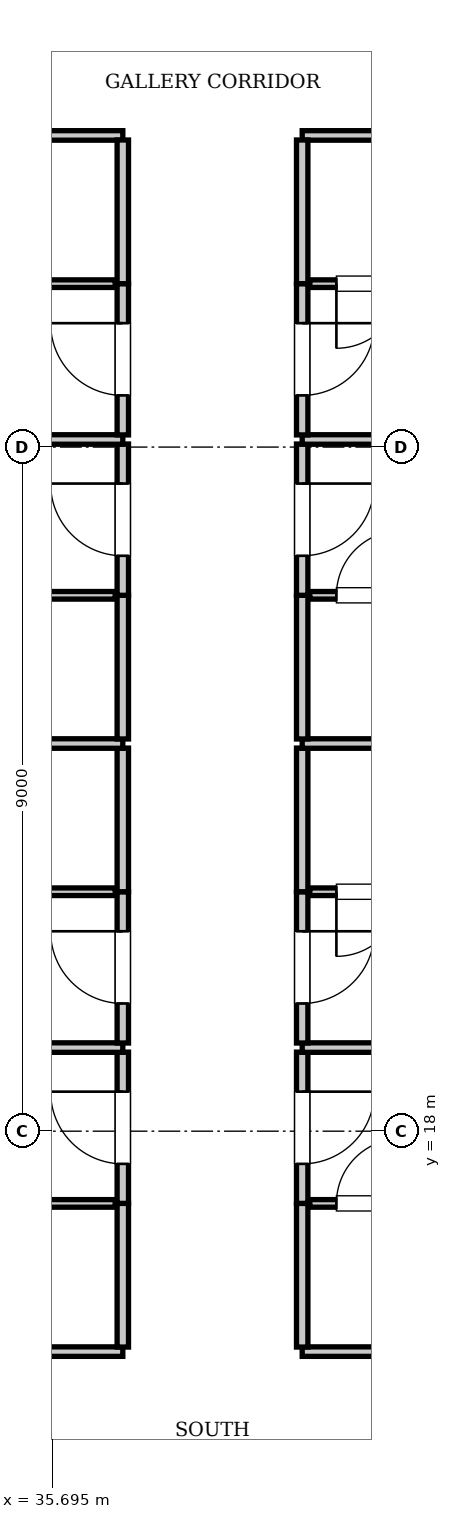
"""IFC4 building model, lengths in metres.
Left out: names, types, materials, properties, quantities, classifications, styles, units other than length and angle.
Written with IfcOpenShell. Run it as: python <this file> out.ifc"""

import sys

from ifc_helpers import new_model, si_unit, direction, frame, frame_2d, origin, place, context, subcontext, project, spatial, rectangle, extrude, element, fill, save


model = new_model("IFC4")
c1 = context("Model", 3, precision=1e-05, world=origin(), true_north=direction((0.0, 1.0)))
c2 = subcontext(c1, "Body", "Model", "MODEL_VIEW")
j1 = project(units=[si_unit("LENGTHUNIT", "METRE"), si_unit("PLANEANGLEUNIT", "RADIAN")], contexts=[c1])
p1 = place(None, origin())
s1 = spatial("IfcSite", under=j1, at=p1, CompositionType="ELEMENT")
p2 = place(p1, origin())
s2 = spatial("IfcBuilding", under=s1, at=p2, CompositionType="ELEMENT")
p3 = place(p2, frame((0.0, 0.0, 135.1)))
s3 = spatial("IfcBuildingStorey", under=s2, at=p3, CompositionType="ELEMENT", Elevation=135.1)
p4 = place(p3, frame((13.2, 15.1, 0.0), z_axis=(0.0, 0.0, 1.0), x_axis=(1.0, 0.0, 0.0)))
e1 = element("IfcWall", 1, at=p4, inside=s3, PredefinedType="PARTITIONING", context=c2, shape_type="SweptSolid", body=[
    extrude(rectangle(XDim=23.42, YDim=0.125, at=frame_2d((11.71, 0.0))), origin(), (0.0, 0.0, 1.0), 3.61),
])
p5 = place(p3, frame((38.98, 15.1, 0.0), z_axis=(0.0, 0.0, 1.0), x_axis=(1.0, 0.0, 0.0)))
e2 = element("IfcWall", 2, at=p5, inside=s3, PredefinedType="PARTITIONING", context=c2, shape_type="SweptSolid", body=[
    extrude(rectangle(XDim=23.42, YDim=0.125, at=frame_2d((11.71, 0.0))), origin(), (0.0, 0.0, 1.0), 3.61),
])
p6 = place(p3, frame((13.2, 31.1, 0.0), z_axis=(0.0, 0.0, 1.0), x_axis=(1.0, 0.0, 0.0)))
e3 = element("IfcWall", 3, at=p6, inside=s3, PredefinedType="PARTITIONING", context=c2, shape_type="SweptSolid", body=[
    extrude(rectangle(XDim=23.42, YDim=0.125, at=frame_2d((11.71, 0.0))), origin(), (0.0, 0.0, 1.0), 3.61),
])
p7 = place(p3, frame((38.98, 31.1, 0.0), z_axis=(0.0, 0.0, 1.0), x_axis=(1.0, 0.0, 0.0)))
e4 = element("IfcWall", 4, at=p7, inside=s3, PredefinedType="PARTITIONING", context=c2, shape_type="SweptSolid", body=[
    extrude(rectangle(XDim=23.42, YDim=0.125, at=frame_2d((11.71, 0.0))), origin(), (0.0, 0.0, 1.0), 3.61),
])
p8 = place(p3, frame((36.62, 15.16, 0.0), z_axis=(0.0, 0.0, 1.0), x_axis=(0.0, 1.0, 0.0)))
e5 = element("IfcWall", 5, at=p8, inside=s3, PredefinedType="PARTITIONING", context=c2, shape_type="SweptSolid", body=[
    extrude(rectangle(XDim=1.89, YDim=0.15, at=frame_2d((0.945, 0.0))), origin(), (0.0, 0.0, 1.0), 3.61),
])
p9 = place(p3, frame((36.62, 17.05, 0.0), z_axis=(0.0, 0.0, 1.0), x_axis=(0.0, 1.0, 0.0)))
e6 = element("IfcWall", 6, at=p9, inside=s3, PredefinedType="PARTITIONING", context=c2, shape_type="SweptSolid", body=[
    extrude(rectangle(XDim=1.99, YDim=0.15, at=frame_2d((0.995, 0.0))), origin(), (0.0, 0.0, 1.0), 3.61),
])
p10 = place(p9, frame((0.52, 0.0, 0.0)))
e7 = element("IfcOpeningElement", 7, at=p10, cuts=e6, PredefinedType="OPENING", context=c2, shape_type="SweptSolid", body=[
    extrude(rectangle(XDim=0.95, YDim=2.15, at=frame_2d((0.475, 1.075))), frame((0.0, 0.085, 0.0), z_axis=(0.0, -1.0, 0.0), x_axis=(1.0, 0.0, 0.0)), (0.0, 0.0, 1.0), 0.17),
])
p11 = place(p3, frame((34.22, 17.05, 0.0), z_axis=(0.0, 0.0, 1.0), x_axis=(1.0, 0.0, 0.0)))
e8 = element("IfcWall", 8, at=p11, inside=s3, PredefinedType="PARTITIONING", context=c2, shape_type="SweptSolid", body=[
    extrude(rectangle(XDim=2.3, YDim=0.1, at=frame_2d((1.15, 0.0))), origin(), (0.0, 0.0, 1.0), 3.61),
])
p12 = place(p11, frame((0.35, 0.0, 0.0)))
e9 = element("IfcOpeningElement", 9, at=p12, cuts=e8, PredefinedType="OPENING", context=c2, shape_type="SweptSolid", body=[
    extrude(rectangle(XDim=0.85, YDim=2.1, at=frame_2d((0.425, 1.05))), frame((0.0, 0.06, 0.0), z_axis=(0.0, -1.0, 0.0), x_axis=(1.0, 0.0, 0.0)), (0.0, 0.0, 1.0), 0.12),
])
p13 = place(p3, frame((38.98, 15.16, 0.0), z_axis=(0.0, 0.0, 1.0), x_axis=(0.0, 1.0, 0.0)))
e10 = element("IfcWall", 10, at=p13, inside=s3, PredefinedType="PARTITIONING", context=c2, shape_type="SweptSolid", body=[
    extrude(rectangle(XDim=1.89, YDim=0.15, at=frame_2d((0.945, 0.0))), origin(), (0.0, 0.0, 1.0), 3.61),
])
p14 = place(p3, frame((38.98, 17.05, 0.0), z_axis=(0.0, 0.0, 1.0), x_axis=(0.0, 1.0, 0.0)))
e11 = element("IfcWall", 11, at=p14, inside=s3, PredefinedType="PARTITIONING", context=c2, shape_type="SweptSolid", body=[
    extrude(rectangle(XDim=1.99, YDim=0.15, at=frame_2d((0.995, 0.0))), origin(), (0.0, 0.0, 1.0), 3.61),
])
p15 = place(p14, frame((0.52, 0.0, 0.0)))
e12 = element("IfcOpeningElement", 12, at=p15, cuts=e11, PredefinedType="OPENING", context=c2, shape_type="SweptSolid", body=[
    extrude(rectangle(XDim=0.95, YDim=2.15, at=frame_2d((0.475, 1.075))), frame((0.0, 0.085, 0.0), z_axis=(0.0, -1.0, 0.0), x_axis=(1.0, 0.0, 0.0)), (0.0, 0.0, 1.0), 0.17),
])
p16 = place(p3, frame((39.08, 17.05, 0.0), z_axis=(0.0, 0.0, 1.0), x_axis=(1.0, 0.0, 0.0)))
e13 = element("IfcWall", 13, at=p16, inside=s3, PredefinedType="PARTITIONING", context=c2, shape_type="SweptSolid", body=[
    extrude(rectangle(XDim=2.3, YDim=0.1, at=frame_2d((1.15, 0.0))), origin(), (0.0, 0.0, 1.0), 3.61),
])
p17 = place(p16, frame((0.35, 0.0, 0.0)))
e14 = element("IfcOpeningElement", 14, at=p17, cuts=e13, PredefinedType="OPENING", context=c2, shape_type="SweptSolid", body=[
    extrude(rectangle(XDim=0.85, YDim=2.1, at=frame_2d((0.425, 1.05))), frame((0.0, 0.06, 0.0), z_axis=(0.0, -1.0, 0.0), x_axis=(1.0, 0.0, 0.0)), (0.0, 0.0, 1.0), 0.12),
])
p18 = place(p3, frame((13.2, 19.1, 0.0), z_axis=(0.0, 0.0, 1.0), x_axis=(1.0, 0.0, 0.0)))
e15 = element("IfcWall", 15, at=p18, inside=s3, PredefinedType="PARTITIONING", context=c2, shape_type="SweptSolid", body=[
    extrude(rectangle(XDim=23.42, YDim=0.125, at=frame_2d((11.71, 0.0))), origin(), (0.0, 0.0, 1.0), 3.61),
])
p19 = place(p3, frame((38.98, 19.1, 0.0), z_axis=(0.0, 0.0, 1.0), x_axis=(1.0, 0.0, 0.0)))
e16 = element("IfcWall", 16, at=p19, inside=s3, PredefinedType="PARTITIONING", context=c2, shape_type="SweptSolid", body=[
    extrude(rectangle(XDim=23.42, YDim=0.125, at=frame_2d((11.71, 0.0))), origin(), (0.0, 0.0, 1.0), 3.61),
])
p20 = place(p3, frame((36.62, 19.16, 0.0), z_axis=(0.0, 0.0, 1.0), x_axis=(0.0, 1.0, 0.0)))
e17 = element("IfcWall", 17, at=p20, inside=s3, PredefinedType="PARTITIONING", context=c2, shape_type="SweptSolid", body=[
    extrude(rectangle(XDim=1.99, YDim=0.15, at=frame_2d((0.995, 0.0))), origin(), (0.0, 0.0, 1.0), 3.61),
])
p21 = place(p20, frame((0.52, 0.0, 0.0)))
e18 = element("IfcOpeningElement", 18, at=p21, cuts=e17, PredefinedType="OPENING", context=c2, shape_type="SweptSolid", body=[
    extrude(rectangle(XDim=0.95, YDim=2.15, at=frame_2d((0.475, 1.075))), frame((0.0, 0.085, 0.0), z_axis=(0.0, -1.0, 0.0), x_axis=(1.0, 0.0, 0.0)), (0.0, 0.0, 1.0), 0.17),
])
p22 = place(p3, frame((36.62, 21.15, 0.0), z_axis=(0.0, 0.0, 1.0), x_axis=(0.0, 1.0, 0.0)))
e19 = element("IfcWall", 19, at=p22, inside=s3, PredefinedType="PARTITIONING", context=c2, shape_type="SweptSolid", body=[
    extrude(rectangle(XDim=1.89, YDim=0.15, at=frame_2d((0.945, 0.0))), origin(), (0.0, 0.0, 1.0), 3.61),
])
p23 = place(p3, frame((34.22, 21.15, 0.0), z_axis=(0.0, 0.0, 1.0), x_axis=(1.0, 0.0, 0.0)))
e20 = element("IfcWall", 20, at=p23, inside=s3, PredefinedType="PARTITIONING", context=c2, shape_type="SweptSolid", body=[
    extrude(rectangle(XDim=2.3, YDim=0.1, at=frame_2d((1.15, 0.0))), origin(), (0.0, 0.0, 1.0), 3.61),
])
p24 = place(p23, frame((0.35, 0.0, 0.0)))
e21 = element("IfcOpeningElement", 21, at=p24, cuts=e20, PredefinedType="OPENING", context=c2, shape_type="SweptSolid", body=[
    extrude(rectangle(XDim=0.85, YDim=2.1, at=frame_2d((0.425, 1.05))), frame((0.0, 0.06, 0.0), z_axis=(0.0, -1.0, 0.0), x_axis=(1.0, 0.0, 0.0)), (0.0, 0.0, 1.0), 0.12),
])
p25 = place(p3, frame((38.98, 19.16, 0.0), z_axis=(0.0, 0.0, 1.0), x_axis=(0.0, 1.0, 0.0)))
e22 = element("IfcWall", 22, at=p25, inside=s3, PredefinedType="PARTITIONING", context=c2, shape_type="SweptSolid", body=[
    extrude(rectangle(XDim=1.99, YDim=0.15, at=frame_2d((0.995, 0.0))), origin(), (0.0, 0.0, 1.0), 3.61),
])
p26 = place(p25, frame((0.52, 0.0, 0.0)))
e23 = element("IfcOpeningElement", 23, at=p26, cuts=e22, PredefinedType="OPENING", context=c2, shape_type="SweptSolid", body=[
    extrude(rectangle(XDim=0.95, YDim=2.15, at=frame_2d((0.475, 1.075))), frame((0.0, 0.085, 0.0), z_axis=(0.0, -1.0, 0.0), x_axis=(1.0, 0.0, 0.0)), (0.0, 0.0, 1.0), 0.17),
])
p27 = place(p3, frame((38.98, 21.15, 0.0), z_axis=(0.0, 0.0, 1.0), x_axis=(0.0, 1.0, 0.0)))
e24 = element("IfcWall", 24, at=p27, inside=s3, PredefinedType="PARTITIONING", context=c2, shape_type="SweptSolid", body=[
    extrude(rectangle(XDim=1.89, YDim=0.15, at=frame_2d((0.945, 0.0))), origin(), (0.0, 0.0, 1.0), 3.61),
])
p28 = place(p3, frame((39.08, 21.15, 0.0), z_axis=(0.0, 0.0, 1.0), x_axis=(1.0, 0.0, 0.0)))
e25 = element("IfcWall", 25, at=p28, inside=s3, PredefinedType="PARTITIONING", context=c2, shape_type="SweptSolid", body=[
    extrude(rectangle(XDim=2.3, YDim=0.1, at=frame_2d((1.15, 0.0))), origin(), (0.0, 0.0, 1.0), 3.61),
])
p29 = place(p28, frame((0.35, 0.0, 0.0)))
e26 = element("IfcOpeningElement", 26, at=p29, cuts=e25, PredefinedType="OPENING", context=c2, shape_type="SweptSolid", body=[
    extrude(rectangle(XDim=0.85, YDim=2.1, at=frame_2d((0.425, 1.05))), frame((0.0, 0.06, 0.0), z_axis=(0.0, -1.0, 0.0), x_axis=(1.0, 0.0, 0.0)), (0.0, 0.0, 1.0), 0.12),
])
p30 = place(p3, frame((13.2, 23.1, 0.0), z_axis=(0.0, 0.0, 1.0), x_axis=(1.0, 0.0, 0.0)))
e27 = element("IfcWall", 27, at=p30, inside=s3, PredefinedType="PARTITIONING", context=c2, shape_type="SweptSolid", body=[
    extrude(rectangle(XDim=23.42, YDim=0.125, at=frame_2d((11.71, 0.0))), origin(), (0.0, 0.0, 1.0), 3.61),
])
p31 = place(p3, frame((38.98, 23.1, 0.0), z_axis=(0.0, 0.0, 1.0), x_axis=(1.0, 0.0, 0.0)))
e28 = element("IfcWall", 28, at=p31, inside=s3, PredefinedType="PARTITIONING", context=c2, shape_type="SweptSolid", body=[
    extrude(rectangle(XDim=23.42, YDim=0.125, at=frame_2d((11.71, 0.0))), origin(), (0.0, 0.0, 1.0), 3.61),
])
p32 = place(p3, frame((36.62, 23.16, 0.0), z_axis=(0.0, 0.0, 1.0), x_axis=(0.0, 1.0, 0.0)))
e29 = element("IfcWall", 29, at=p32, inside=s3, PredefinedType="PARTITIONING", context=c2, shape_type="SweptSolid", body=[
    extrude(rectangle(XDim=1.89, YDim=0.15, at=frame_2d((0.945, 0.0))), origin(), (0.0, 0.0, 1.0), 3.61),
])
p33 = place(p3, frame((36.62, 25.05, 0.0), z_axis=(0.0, 0.0, 1.0), x_axis=(0.0, 1.0, 0.0)))
e30 = element("IfcWall", 30, at=p33, inside=s3, PredefinedType="PARTITIONING", context=c2, shape_type="SweptSolid", body=[
    extrude(rectangle(XDim=1.99, YDim=0.15, at=frame_2d((0.995, 0.0))), origin(), (0.0, 0.0, 1.0), 3.61),
])
p34 = place(p33, frame((0.52, 0.0, 0.0)))
e31 = element("IfcOpeningElement", 31, at=p34, cuts=e30, PredefinedType="OPENING", context=c2, shape_type="SweptSolid", body=[
    extrude(rectangle(XDim=0.95, YDim=2.15, at=frame_2d((0.475, 1.075))), frame((0.0, 0.085, 0.0), z_axis=(0.0, -1.0, 0.0), x_axis=(1.0, 0.0, 0.0)), (0.0, 0.0, 1.0), 0.17),
])
p35 = place(p3, frame((34.22, 25.05, 0.0), z_axis=(0.0, 0.0, 1.0), x_axis=(1.0, 0.0, 0.0)))
e32 = element("IfcWall", 32, at=p35, inside=s3, PredefinedType="PARTITIONING", context=c2, shape_type="SweptSolid", body=[
    extrude(rectangle(XDim=2.3, YDim=0.1, at=frame_2d((1.15, 0.0))), origin(), (0.0, 0.0, 1.0), 3.61),
])
p36 = place(p35, frame((0.35, 0.0, 0.0)))
e33 = element("IfcOpeningElement", 33, at=p36, cuts=e32, PredefinedType="OPENING", context=c2, shape_type="SweptSolid", body=[
    extrude(rectangle(XDim=0.85, YDim=2.1, at=frame_2d((0.425, 1.05))), frame((0.0, 0.06, 0.0), z_axis=(0.0, -1.0, 0.0), x_axis=(1.0, 0.0, 0.0)), (0.0, 0.0, 1.0), 0.12),
])
p37 = place(p3, frame((38.98, 23.16, 0.0), z_axis=(0.0, 0.0, 1.0), x_axis=(0.0, 1.0, 0.0)))
e34 = element("IfcWall", 34, at=p37, inside=s3, PredefinedType="PARTITIONING", context=c2, shape_type="SweptSolid", body=[
    extrude(rectangle(XDim=1.89, YDim=0.15, at=frame_2d((0.945, 0.0))), origin(), (0.0, 0.0, 1.0), 3.61),
])
p38 = place(p3, frame((38.98, 25.05, 0.0), z_axis=(0.0, 0.0, 1.0), x_axis=(0.0, 1.0, 0.0)))
e35 = element("IfcWall", 35, at=p38, inside=s3, PredefinedType="PARTITIONING", context=c2, shape_type="SweptSolid", body=[
    extrude(rectangle(XDim=1.99, YDim=0.15, at=frame_2d((0.995, 0.0))), origin(), (0.0, 0.0, 1.0), 3.61),
])
p39 = place(p38, frame((0.52, 0.0, 0.0)))
e36 = element("IfcOpeningElement", 36, at=p39, cuts=e35, PredefinedType="OPENING", context=c2, shape_type="SweptSolid", body=[
    extrude(rectangle(XDim=0.95, YDim=2.15, at=frame_2d((0.475, 1.075))), frame((0.0, 0.085, 0.0), z_axis=(0.0, -1.0, 0.0), x_axis=(1.0, 0.0, 0.0)), (0.0, 0.0, 1.0), 0.17),
])
p40 = place(p3, frame((39.08, 25.05, 0.0), z_axis=(0.0, 0.0, 1.0), x_axis=(1.0, 0.0, 0.0)))
e37 = element("IfcWall", 37, at=p40, inside=s3, PredefinedType="PARTITIONING", context=c2, shape_type="SweptSolid", body=[
    extrude(rectangle(XDim=2.3, YDim=0.1, at=frame_2d((1.15, 0.0))), origin(), (0.0, 0.0, 1.0), 3.61),
])
p41 = place(p40, frame((0.35, 0.0, 0.0)))
e38 = element("IfcOpeningElement", 38, at=p41, cuts=e37, PredefinedType="OPENING", context=c2, shape_type="SweptSolid", body=[
    extrude(rectangle(XDim=0.85, YDim=2.1, at=frame_2d((0.425, 1.05))), frame((0.0, 0.06, 0.0), z_axis=(0.0, -1.0, 0.0), x_axis=(1.0, 0.0, 0.0)), (0.0, 0.0, 1.0), 0.12),
])
p42 = place(p3, frame((13.2, 27.1, 0.0), z_axis=(0.0, 0.0, 1.0), x_axis=(1.0, 0.0, 0.0)))
e39 = element("IfcWall", 39, at=p42, inside=s3, PredefinedType="PARTITIONING", context=c2, shape_type="SweptSolid", body=[
    extrude(rectangle(XDim=23.42, YDim=0.125, at=frame_2d((11.71, 0.0))), origin(), (0.0, 0.0, 1.0), 2.41),
])
p43 = place(p3, frame((38.98, 27.1, 0.0), z_axis=(0.0, 0.0, 1.0), x_axis=(1.0, 0.0, 0.0)))
e40 = element("IfcWall", 40, at=p43, inside=s3, PredefinedType="PARTITIONING", context=c2, shape_type="SweptSolid", body=[
    extrude(rectangle(XDim=23.42, YDim=0.125, at=frame_2d((11.71, 0.0))), origin(), (0.0, 0.0, 1.0), 2.41),
])
p44 = place(p3, frame((36.62, 27.16, 0.0), z_axis=(0.0, 0.0, 1.0), x_axis=(0.0, 1.0, 0.0)))
e41 = element("IfcWall", 41, at=p44, inside=s3, PredefinedType="PARTITIONING", context=c2, shape_type="SweptSolid", body=[
    extrude(rectangle(XDim=1.99, YDim=0.15, at=frame_2d((0.995, 0.0))), origin(), (0.0, 0.0, 1.0), 3.61),
])
p45 = place(p44, frame((0.52, 0.0, 0.0)))
e42 = element("IfcOpeningElement", 42, at=p45, cuts=e41, PredefinedType="OPENING", context=c2, shape_type="SweptSolid", body=[
    extrude(rectangle(XDim=0.95, YDim=2.15, at=frame_2d((0.475, 1.075))), frame((0.0, 0.085, 0.0), z_axis=(0.0, -1.0, 0.0), x_axis=(1.0, 0.0, 0.0)), (0.0, 0.0, 1.0), 0.17),
])
p46 = place(p3, frame((36.62, 29.15, 0.0), z_axis=(0.0, 0.0, 1.0), x_axis=(0.0, 1.0, 0.0)))
e43 = element("IfcWall", 43, at=p46, inside=s3, PredefinedType="PARTITIONING", context=c2, shape_type="SweptSolid", body=[
    extrude(rectangle(XDim=1.89, YDim=0.15, at=frame_2d((0.945, 0.0))), origin(), (0.0, 0.0, 1.0), 3.61),
])
p47 = place(p3, frame((34.22, 29.15, 0.0), z_axis=(0.0, 0.0, 1.0), x_axis=(1.0, 0.0, 0.0)))
e44 = element("IfcWall", 44, at=p47, inside=s3, PredefinedType="PARTITIONING", context=c2, shape_type="SweptSolid", body=[
    extrude(rectangle(XDim=2.3, YDim=0.1, at=frame_2d((1.15, 0.0))), origin(), (0.0, 0.0, 1.0), 3.61),
])
p48 = place(p47, frame((0.35, 0.0, 0.0)))
e45 = element("IfcOpeningElement", 45, at=p48, cuts=e44, PredefinedType="OPENING", context=c2, shape_type="SweptSolid", body=[
    extrude(rectangle(XDim=0.85, YDim=2.1, at=frame_2d((0.425, 1.05))), frame((0.0, 0.06, 0.0), z_axis=(0.0, -1.0, 0.0), x_axis=(1.0, 0.0, 0.0)), (0.0, 0.0, 1.0), 0.12),
])
p49 = place(p3, frame((38.98, 27.16, 0.0), z_axis=(0.0, 0.0, 1.0), x_axis=(0.0, 1.0, 0.0)))
e46 = element("IfcWall", 46, at=p49, inside=s3, PredefinedType="PARTITIONING", context=c2, shape_type="SweptSolid", body=[
    extrude(rectangle(XDim=1.99, YDim=0.15, at=frame_2d((0.995, 0.0))), origin(), (0.0, 0.0, 1.0), 3.61),
])
p50 = place(p49, frame((0.52, 0.0, 0.0)))
e47 = element("IfcOpeningElement", 47, at=p50, cuts=e46, PredefinedType="OPENING", context=c2, shape_type="SweptSolid", body=[
    extrude(rectangle(XDim=0.95, YDim=2.15, at=frame_2d((0.475, 1.075))), frame((0.0, 0.085, 0.0), z_axis=(0.0, -1.0, 0.0), x_axis=(1.0, 0.0, 0.0)), (0.0, 0.0, 1.0), 0.17),
])
p51 = place(p3, frame((38.98, 29.15, 0.0), z_axis=(0.0, 0.0, 1.0), x_axis=(0.0, 1.0, 0.0)))
e48 = element("IfcWall", 48, at=p51, inside=s3, PredefinedType="PARTITIONING", context=c2, shape_type="SweptSolid", body=[
    extrude(rectangle(XDim=1.89, YDim=0.15, at=frame_2d((0.945, 0.0))), origin(), (0.0, 0.0, 1.0), 3.61),
])
p52 = place(p3, frame((39.08, 29.15, 0.0), z_axis=(0.0, 0.0, 1.0), x_axis=(1.0, 0.0, 0.0)))
e49 = element("IfcWall", 49, at=p52, inside=s3, PredefinedType="PARTITIONING", context=c2, shape_type="SweptSolid", body=[
    extrude(rectangle(XDim=2.3, YDim=0.1, at=frame_2d((1.15, 0.0))), origin(), (0.0, 0.0, 1.0), 3.61),
])
p53 = place(p52, frame((0.35, 0.0, 0.0)))
e50 = element("IfcOpeningElement", 50, at=p53, cuts=e49, PredefinedType="OPENING", context=c2, shape_type="SweptSolid", body=[
    extrude(rectangle(XDim=0.85, YDim=2.1, at=frame_2d((0.425, 1.05))), frame((0.0, 0.06, 0.0), z_axis=(0.0, -1.0, 0.0), x_axis=(1.0, 0.0, 0.0)), (0.0, 0.0, 1.0), 0.12),
])
p54 = place(p10, origin())
e51 = element("IfcDoor", 51, at=p54, inside=s3, OperationType="SINGLE_SWING_RIGHT", PredefinedType="DOOR", context=c2, shape_type="SweptSolid", body=[
    extrude(rectangle(XDim=0.95, YDim=2.15, at=frame_2d((0.475, 1.075))), frame((0.0, 0.025, 0.0), z_axis=(0.0, -1.0, 0.0), x_axis=(1.0, 0.0, 0.0)), (0.0, 0.0, 1.0), 0.05),
])
fill(e7, e51)
p55 = place(p17, origin())
e52 = element("IfcDoor", 52, at=p55, inside=s3, OperationType="SINGLE_SWING_RIGHT", PredefinedType="DOOR", context=c2, shape_type="SweptSolid", body=[
    extrude(rectangle(XDim=0.85, YDim=2.1, at=frame_2d((0.425, 1.05))), frame((0.0, 0.025, 0.0), z_axis=(0.0, -1.0, 0.0), x_axis=(1.0, 0.0, 0.0)), (0.0, 0.0, 1.0), 0.05),
])
fill(e14, e52)
p56 = place(p15, frame((0.95, 0.0, 0.0), z_axis=(0.0, 0.0, 1.0), x_axis=(-1.0, 0.0, 0.0)))
e53 = element("IfcDoor", 53, at=p56, inside=s3, OperationType="SINGLE_SWING_LEFT", PredefinedType="DOOR", context=c2, shape_type="SweptSolid", body=[
    extrude(rectangle(XDim=0.95, YDim=2.15, at=frame_2d((0.475, 1.075))), frame((0.0, 0.025, 0.0), z_axis=(0.0, -1.0, 0.0), x_axis=(1.0, 0.0, 0.0)), (0.0, 0.0, 1.0), 0.05),
])
fill(e12, e53)
p57 = place(p21, origin())
e54 = element("IfcDoor", 54, at=p57, inside=s3, OperationType="SINGLE_SWING_RIGHT", PredefinedType="DOOR", context=c2, shape_type="SweptSolid", body=[
    extrude(rectangle(XDim=0.95, YDim=2.15, at=frame_2d((0.475, 1.075))), frame((0.0, 0.025, 0.0), z_axis=(0.0, -1.0, 0.0), x_axis=(1.0, 0.0, 0.0)), (0.0, 0.0, 1.0), 0.05),
])
fill(e18, e54)
p58 = place(p29, frame((0.85, 0.0, 0.0), z_axis=(0.0, 0.0, 1.0), x_axis=(-1.0, 0.0, 0.0)))
e55 = element("IfcDoor", 55, at=p58, inside=s3, OperationType="SINGLE_SWING_RIGHT", PredefinedType="DOOR", context=c2, shape_type="SweptSolid", body=[
    extrude(rectangle(XDim=0.85, YDim=2.1, at=frame_2d((0.425, 1.05))), frame((0.0, 0.025, 0.0), z_axis=(0.0, -1.0, 0.0), x_axis=(1.0, 0.0, 0.0)), (0.0, 0.0, 1.0), 0.05),
])
fill(e26, e55)
p59 = place(p26, frame((0.95, 0.0, 0.0), z_axis=(0.0, 0.0, 1.0), x_axis=(-1.0, 0.0, 0.0)))
e56 = element("IfcDoor", 56, at=p59, inside=s3, OperationType="SINGLE_SWING_LEFT", PredefinedType="DOOR", context=c2, shape_type="SweptSolid", body=[
    extrude(rectangle(XDim=0.95, YDim=2.15, at=frame_2d((0.475, 1.075))), frame((0.0, 0.025, 0.0), z_axis=(0.0, -1.0, 0.0), x_axis=(1.0, 0.0, 0.0)), (0.0, 0.0, 1.0), 0.05),
])
fill(e23, e56)
p60 = place(p34, origin())
e57 = element("IfcDoor", 57, at=p60, inside=s3, OperationType="SINGLE_SWING_RIGHT", PredefinedType="DOOR", context=c2, shape_type="SweptSolid", body=[
    extrude(rectangle(XDim=0.95, YDim=2.15, at=frame_2d((0.475, 1.075))), frame((0.0, 0.025, 0.0), z_axis=(0.0, -1.0, 0.0), x_axis=(1.0, 0.0, 0.0)), (0.0, 0.0, 1.0), 0.05),
])
fill(e31, e57)
p61 = place(p41, origin())
e58 = element("IfcDoor", 58, at=p61, inside=s3, OperationType="SINGLE_SWING_RIGHT", PredefinedType="DOOR", context=c2, shape_type="SweptSolid", body=[
    extrude(rectangle(XDim=0.85, YDim=2.1, at=frame_2d((0.425, 1.05))), frame((0.0, 0.025, 0.0), z_axis=(0.0, -1.0, 0.0), x_axis=(1.0, 0.0, 0.0)), (0.0, 0.0, 1.0), 0.05),
])
fill(e38, e58)
p62 = place(p39, frame((0.95, 0.0, 0.0), z_axis=(0.0, 0.0, 1.0), x_axis=(-1.0, 0.0, 0.0)))
e59 = element("IfcDoor", 59, at=p62, inside=s3, OperationType="SINGLE_SWING_LEFT", PredefinedType="DOOR", context=c2, shape_type="SweptSolid", body=[
    extrude(rectangle(XDim=0.95, YDim=2.15, at=frame_2d((0.475, 1.075))), frame((0.0, 0.025, 0.0), z_axis=(0.0, -1.0, 0.0), x_axis=(1.0, 0.0, 0.0)), (0.0, 0.0, 1.0), 0.05),
])
fill(e36, e59)
p63 = place(p45, origin())
e60 = element("IfcDoor", 60, at=p63, inside=s3, OperationType="SINGLE_SWING_RIGHT", PredefinedType="DOOR", context=c2, shape_type="SweptSolid", body=[
    extrude(rectangle(XDim=0.95, YDim=2.15, at=frame_2d((0.475, 1.075))), frame((0.0, 0.025, 0.0), z_axis=(0.0, -1.0, 0.0), x_axis=(1.0, 0.0, 0.0)), (0.0, 0.0, 1.0), 0.05),
])
fill(e42, e60)
p64 = place(p53, frame((0.85, 0.0, 0.0), z_axis=(0.0, 0.0, 1.0), x_axis=(-1.0, 0.0, 0.0)))
e61 = element("IfcDoor", 61, at=p64, inside=s3, OperationType="SINGLE_SWING_RIGHT", PredefinedType="DOOR", context=c2, shape_type="SweptSolid", body=[
    extrude(rectangle(XDim=0.85, YDim=2.1, at=frame_2d((0.425, 1.05))), frame((0.0, 0.025, 0.0), z_axis=(0.0, -1.0, 0.0), x_axis=(1.0, 0.0, 0.0)), (0.0, 0.0, 1.0), 0.05),
])
fill(e50, e61)
p65 = place(p50, frame((0.95, 0.0, 0.0), z_axis=(0.0, 0.0, 1.0), x_axis=(-1.0, 0.0, 0.0)))
e62 = element("IfcDoor", 62, at=p65, inside=s3, OperationType="SINGLE_SWING_LEFT", PredefinedType="DOOR", context=c2, shape_type="SweptSolid", body=[
    extrude(rectangle(XDim=0.95, YDim=2.15, at=frame_2d((0.475, 1.075))), frame((0.0, 0.025, 0.0), z_axis=(0.0, -1.0, 0.0), x_axis=(1.0, 0.0, 0.0)), (0.0, 0.0, 1.0), 0.05),
])
fill(e47, e62)
save(model, sys.argv[1])
